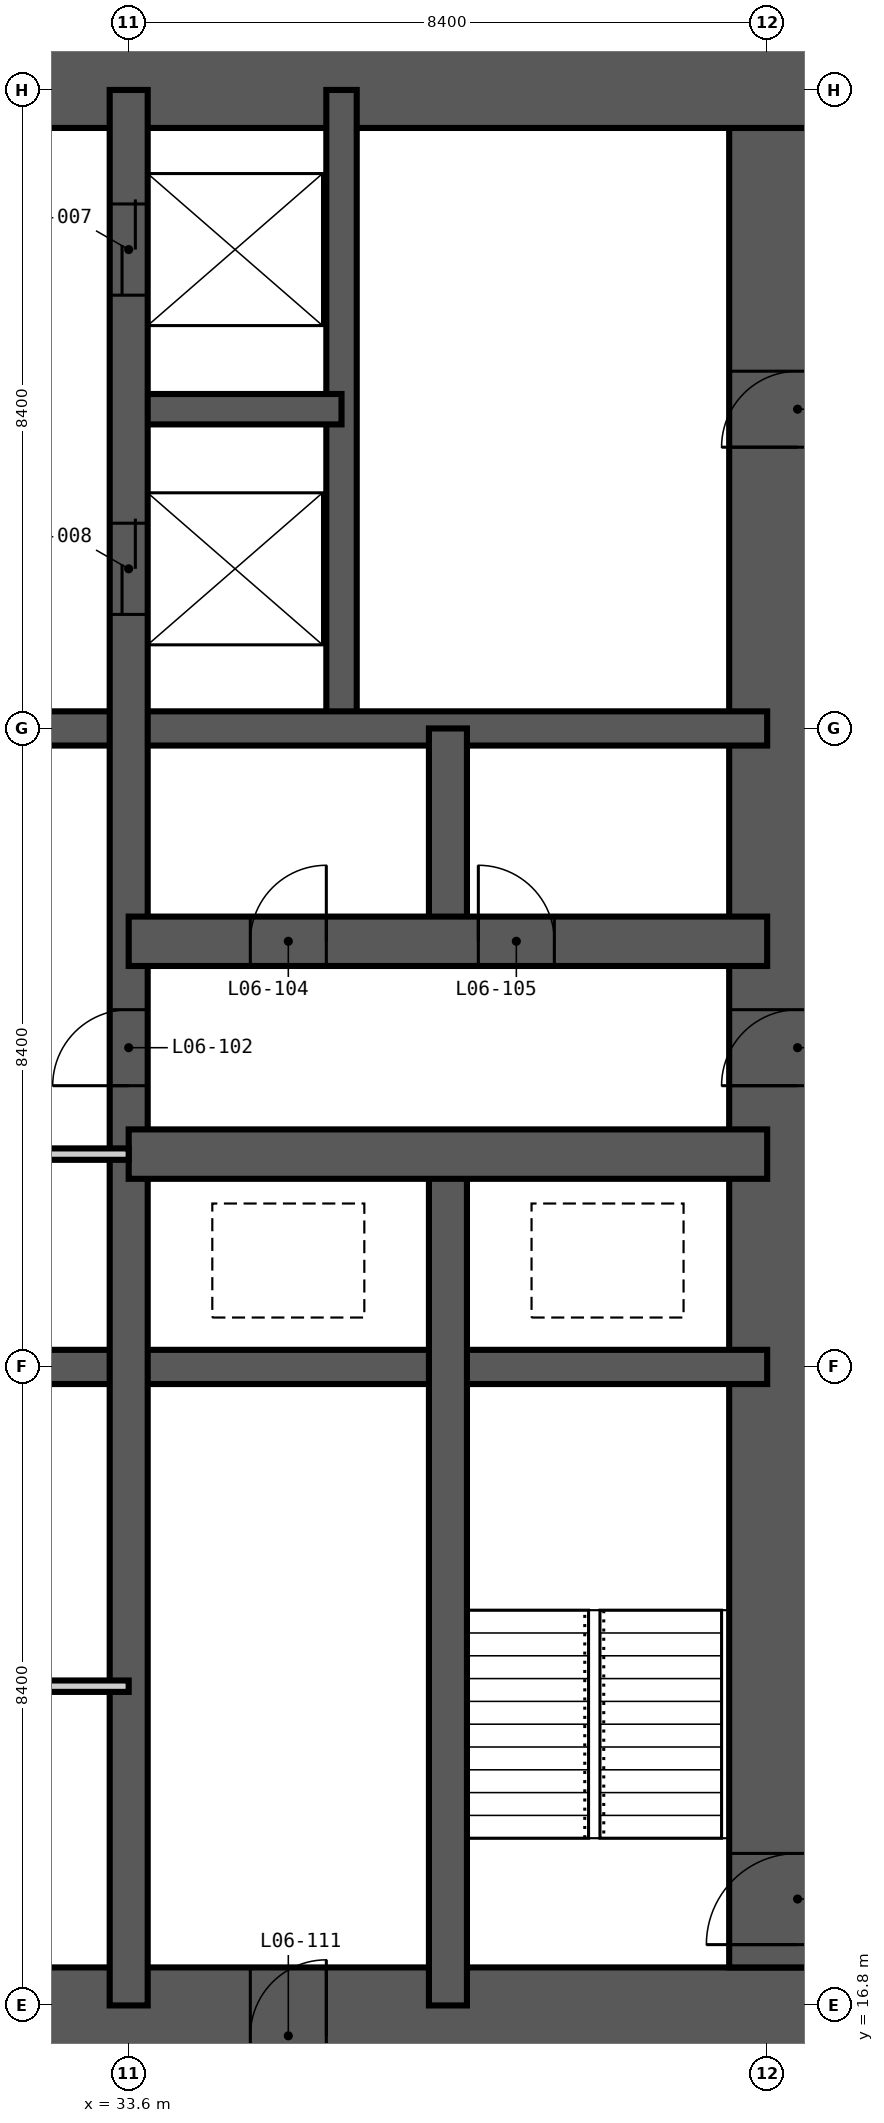
"""IFC4 building model, lengths in metres.
Left out: names, types, materials, properties, quantities, classifications, styles, units other than length and angle.
Written with IfcOpenShell. Run it as: python <this file> out.ifc"""

import sys

from ifc_helpers import new_model, si_unit, direction, frame, frame_2d, origin, place, context, subcontext, project, spatial, rectangle, extrude, element, fill, save


model = new_model("IFC4")
c1 = context("Model", 3, precision=1e-05, world=origin(), true_north=direction((0.0, 1.0)))
c2 = subcontext(c1, "Body", "Model", "MODEL_VIEW")
j1 = project(units=[si_unit("LENGTHUNIT", "METRE"), si_unit("PLANEANGLEUNIT", "RADIAN")], contexts=[c1])
p1 = place(None, origin())
s1 = spatial("IfcSite", under=j1, at=p1, CompositionType="ELEMENT")
p2 = place(p1, origin())
s2 = spatial("IfcBuilding", under=s1, at=p2, CompositionType="ELEMENT")
p3 = place(p2, frame((0.0, 0.0, 30.6)))
s3 = spatial("IfcBuildingStorey", under=s2, at=p3, CompositionType="ELEMENT", Elevation=30.6)
p4 = place(p3, frame((15.5, 16.4, -0.35), z_axis=(0.0, 0.0, 1.0), x_axis=(1.0, 0.0, 0.0)))
e1 = element("IfcWall", 1, at=p4, inside=s3, PredefinedType="SHEAR", context=c2, shape_type="SweptSolid", body=[
    extrude(rectangle(XDim=27.8, YDim=1.8, at=frame_2d((13.9, 0.0))), origin(), (0.0, 0.0, 1.0), 3.6),
])
p5 = place(p4, frame((13.4, 0.0, 0.35)))
e2 = element("IfcOpeningElement", 2, at=p5, cuts=e1, PredefinedType="OPENING", context=c2, shape_type="SweptSolid", body=[
    extrude(rectangle(XDim=1.0, YDim=2.1, at=frame_2d((0.5, 1.05))), frame((0.0, 0.91, 0.0), z_axis=(0.0, -1.0, 0.0), x_axis=(1.0, 0.0, 0.0)), (0.0, 0.0, 1.0), 1.82),
])
p6 = place(p4, frame((19.7, 0.0, 0.35)))
e3 = element("IfcOpeningElement", 3, at=p6, cuts=e1, PredefinedType="OPENING", context=c2, shape_type="SweptSolid", body=[
    extrude(rectangle(XDim=1.0, YDim=2.1, at=frame_2d((0.5, 1.05))), frame((0.0, 0.91, 0.0), z_axis=(0.0, -1.0, 0.0), x_axis=(1.0, 0.0, 0.0)), (0.0, 0.0, 1.0), 1.82),
])
p7 = place(p3, frame((42.4, 17.3, -0.35), z_axis=(0.0, 0.0, 1.0), x_axis=(0.0, 1.0, 0.0)))
e4 = element("IfcWall", 4, at=p7, inside=s3, PredefinedType="SHEAR", context=c2, shape_type="SweptSolid", body=[
    extrude(rectangle(XDim=24.2, YDim=1.8, at=frame_2d((12.1, 0.0))), origin(), (0.0, 0.0, 1.0), 3.6),
])
p8 = place(p7, frame((0.3, 0.0, 0.35)))
e5 = element("IfcOpeningElement", 5, at=p8, cuts=e4, PredefinedType="OPENING", context=c2, shape_type="SweptSolid", body=[
    extrude(rectangle(XDim=1.2, YDim=2.2, at=frame_2d((0.6, 1.1))), frame((0.0, 0.91, 0.0), z_axis=(0.0, -1.0, 0.0), x_axis=(1.0, 0.0, 0.0)), (0.0, 0.0, 1.0), 1.82),
])
p9 = place(p7, frame((11.6, 0.0, 0.35)))
e6 = element("IfcOpeningElement", 6, at=p9, cuts=e4, PredefinedType="OPENING", context=c2, shape_type="SweptSolid", body=[
    extrude(rectangle(XDim=1.0, YDim=2.1, at=frame_2d((0.5, 1.05))), frame((0.0, 0.91, 0.0), z_axis=(0.0, -1.0, 0.0), x_axis=(1.0, 0.0, 0.0)), (0.0, 0.0, 1.0), 1.82),
])
p10 = place(p7, frame((20.0, 0.0, 0.35)))
e7 = element("IfcOpeningElement", 7, at=p10, cuts=e4, PredefinedType="OPENING", context=c2, shape_type="SweptSolid", body=[
    extrude(rectangle(XDim=1.0, YDim=2.1, at=frame_2d((0.5, 1.05))), frame((0.0, 0.91, 0.0), z_axis=(0.0, -1.0, 0.0), x_axis=(1.0, 0.0, 0.0)), (0.0, 0.0, 1.0), 1.82),
])
p11 = place(p3, frame((43.3, 42.4, -0.35), z_axis=(0.0, 0.0, 1.0), x_axis=(-1.0, 0.0, 0.0)))
e8 = element("IfcWall", 8, at=p11, inside=s3, PredefinedType="SHEAR", context=c2, shape_type="SweptSolid", body=[
    extrude(rectangle(XDim=27.8, YDim=1.8, at=frame_2d((13.9, 0.0))), origin(), (0.0, 0.0, 1.0), 3.6),
])
p12 = place(p11, frame((21.8, 0.0, 0.35)))
e9 = element("IfcOpeningElement", 9, at=p12, cuts=e8, PredefinedType="OPENING", context=c2, shape_type="SweptSolid", body=[
    extrude(rectangle(XDim=1.0, YDim=2.1, at=frame_2d((0.5, 1.05))), frame((0.0, 0.91, 0.0), z_axis=(0.0, -1.0, 0.0), x_axis=(1.0, 0.0, 0.0)), (0.0, 0.0, 1.0), 1.82),
])
p13 = place(p11, frame((11.2, 0.0, 0.35)))
e10 = element("IfcOpeningElement", 10, at=p13, cuts=e8, PredefinedType="OPENING", context=c2, shape_type="SweptSolid", body=[
    extrude(rectangle(XDim=1.2, YDim=2.2, at=frame_2d((0.6, 1.1))), frame((0.0, 0.91, 0.0), z_axis=(0.0, -1.0, 0.0), x_axis=(1.0, 0.0, 0.0)), (0.0, 0.0, 1.0), 1.82),
])
p14 = place(p3, frame((36.4, 33.6, -0.35), z_axis=(0.0, 0.0, 1.0), x_axis=(0.0, 1.0, 0.0)))
e11 = element("IfcWall", 11, at=p14, inside=s3, PredefinedType="SHEAR", context=c2, shape_type="SweptSolid", body=[
    extrude(rectangle(XDim=8.4, YDim=0.4, at=frame_2d((4.2, 0.0))), origin(), (0.0, 0.0, 1.0), 3.6),
])
p15 = place(p3, frame((33.6, 37.8, -0.35), z_axis=(0.0, 0.0, 1.0), x_axis=(1.0, 0.0, 0.0)))
e12 = element("IfcWall", 12, at=p15, inside=s3, PredefinedType="SHEAR", context=c2, shape_type="SweptSolid", body=[
    extrude(rectangle(XDim=2.8, YDim=0.4, at=frame_2d((1.4, 0.0))), origin(), (0.0, 0.0, 1.0), 3.6),
])
for number, where, z_axis, x_axis in (
    (13, (16.8, 25.2, -0.35), (0.0, 0.0, 1.0), (1.0, 0.0, 0.0)),
    (14, (16.8, 33.6, -0.35), (0.0, 0.0, 1.0), (1.0, 0.0, 0.0)),
):
    element("IfcWall", number, at=place(p3, frame(where, z_axis=z_axis, x_axis=x_axis)), inside=s3, PredefinedType="SHEAR", context=c2, shape_type="SweptSolid", body=[
        extrude(rectangle(XDim=25.2, YDim=0.45, at=frame_2d((12.6, 0.0))), origin(), (0.0, 0.0, 1.0), 3.6),
    ])
p16 = place(p3, frame((33.6, 16.8, -0.35), z_axis=(0.0, 0.0, 1.0), x_axis=(0.0, 1.0, 0.0)))
e15 = element("IfcWall", 15, at=p16, inside=s3, PredefinedType="SHEAR", context=c2, shape_type="SweptSolid", body=[
    extrude(rectangle(XDim=25.2, YDim=0.5, at=frame_2d((12.6, 0.0))), origin(), (0.0, 0.0, 1.0), 3.6),
])
p17 = place(p16, frame((22.5, 0.0, 0.35)))
e16 = element("IfcOpeningElement", 16, at=p17, cuts=e15, PredefinedType="OPENING", context=c2, shape_type="SweptSolid", body=[
    extrude(rectangle(XDim=1.2, YDim=2.2, at=frame_2d((0.6, 1.1))), frame((0.0, 0.26, 0.0), z_axis=(0.0, -1.0, 0.0), x_axis=(1.0, 0.0, 0.0)), (0.0, 0.0, 1.0), 0.52),
])
p18 = place(p16, frame((18.3, 0.0, 0.35)))
e17 = element("IfcOpeningElement", 17, at=p18, cuts=e15, PredefinedType="OPENING", context=c2, shape_type="SweptSolid", body=[
    extrude(rectangle(XDim=1.2, YDim=2.2, at=frame_2d((0.6, 1.1))), frame((0.0, 0.26, 0.0), z_axis=(0.0, -1.0, 0.0), x_axis=(1.0, 0.0, 0.0)), (0.0, 0.0, 1.0), 0.52),
])
p19 = place(p16, frame((12.1, 0.0, 0.35)))
e18 = element("IfcOpeningElement", 18, at=p19, cuts=e15, PredefinedType="OPENING", context=c2, shape_type="SweptSolid", body=[
    extrude(rectangle(XDim=1.0, YDim=2.1, at=frame_2d((0.5, 1.05))), frame((0.0, 0.26, 0.0), z_axis=(0.0, -1.0, 0.0), x_axis=(1.0, 0.0, 0.0)), (0.0, 0.0, 1.0), 0.52),
])
p20 = place(p3, frame((37.8, 16.8, -0.35), z_axis=(0.0, 0.0, 1.0), x_axis=(0.0, 1.0, 0.0)))
e19 = element("IfcWall", 19, at=p20, inside=s3, PredefinedType="SHEAR", context=c2, shape_type="SweptSolid", body=[
    extrude(rectangle(XDim=11.2, YDim=0.5, at=frame_2d((5.6, 0.0))), origin(), (0.0, 0.0, 1.0), 3.6),
])
p21 = place(p3, frame((37.8, 30.8, -0.35), z_axis=(0.0, 0.0, 1.0), x_axis=(0.0, 1.0, 0.0)))
e20 = element("IfcWall", 20, at=p21, inside=s3, PredefinedType="SHEAR", context=c2, shape_type="SweptSolid", body=[
    extrude(rectangle(XDim=2.8, YDim=0.5, at=frame_2d((1.4, 0.0))), origin(), (0.0, 0.0, 1.0), 3.6),
])
p22 = place(p3, frame((33.6, 28.0, -0.35), z_axis=(0.0, 0.0, 1.0), x_axis=(1.0, 0.0, 0.0)))
e21 = element("IfcWall", 21, at=p22, inside=s3, PredefinedType="SHEAR", context=c2, shape_type="SweptSolid", body=[
    extrude(rectangle(XDim=8.4, YDim=0.65, at=frame_2d((4.2, 0.0))), origin(), (0.0, 0.0, 1.0), 3.6),
])
p23 = place(p3, frame((33.6, 30.8, -0.35), z_axis=(0.0, 0.0, 1.0), x_axis=(1.0, 0.0, 0.0)))
e22 = element("IfcWall", 22, at=p23, inside=s3, PredefinedType="SHEAR", context=c2, shape_type="SweptSolid", body=[
    extrude(rectangle(XDim=8.4, YDim=0.65, at=frame_2d((4.2, 0.0))), origin(), (0.0, 0.0, 1.0), 3.6),
])
p24 = place(p23, frame((1.6, 0.0, 0.35)))
e23 = element("IfcOpeningElement", 23, at=p24, cuts=e22, PredefinedType="OPENING", context=c2, shape_type="SweptSolid", body=[
    extrude(rectangle(XDim=1.0, YDim=2.1, at=frame_2d((0.5, 1.05))), frame((0.0, 0.335, 0.0), z_axis=(0.0, -1.0, 0.0), x_axis=(1.0, 0.0, 0.0)), (0.0, 0.0, 1.0), 0.67),
])
p25 = place(p23, frame((4.6, 0.0, 0.35)))
e24 = element("IfcOpeningElement", 24, at=p25, cuts=e22, PredefinedType="OPENING", context=c2, shape_type="SweptSolid", body=[
    extrude(rectangle(XDim=1.0, YDim=2.1, at=frame_2d((0.5, 1.05))), frame((0.0, 0.335, 0.0), z_axis=(0.0, -1.0, 0.0), x_axis=(1.0, 0.0, 0.0)), (0.0, 0.0, 1.0), 0.67),
])
p26 = place(p3, frame((25.2, 21.0, 0.0), z_axis=(0.0, 0.0, 1.0), x_axis=(1.0, 0.0, 0.0)))
e25 = element("IfcWall", 25, at=p26, inside=s3, PredefinedType="PARTITIONING", context=c2, shape_type="SweptSolid", body=[
    extrude(rectangle(XDim=8.4, YDim=0.15, at=frame_2d((4.2, 0.0))), origin(), (0.0, 0.0, 1.0), 3.25),
])
p27 = place(p26, frame((3.7, 0.0, 0.0)))
e26 = element("IfcOpeningElement", 26, at=p27, cuts=e25, PredefinedType="OPENING", context=c2, shape_type="SweptSolid", body=[
    extrude(rectangle(XDim=1.0, YDim=2.1, at=frame_2d((0.5, 1.05))), frame((0.0, 0.085, 0.0), z_axis=(0.0, -1.0, 0.0), x_axis=(1.0, 0.0, 0.0)), (0.0, 0.0, 1.0), 0.17),
])
p28 = place(p3, frame((25.2, 28.0, 0.0), z_axis=(0.0, 0.0, 1.0), x_axis=(1.0, 0.0, 0.0)))
e27 = element("IfcWall", 27, at=p28, inside=s3, PredefinedType="PARTITIONING", context=c2, shape_type="SweptSolid", body=[
    extrude(rectangle(XDim=8.4, YDim=0.15, at=frame_2d((4.2, 0.0))), origin(), (0.0, 0.0, 1.0), 3.25),
])
p29 = place(p28, frame((3.7, 0.0, 0.0)))
e28 = element("IfcOpeningElement", 28, at=p29, cuts=e27, PredefinedType="OPENING", context=c2, shape_type="SweptSolid", body=[
    extrude(rectangle(XDim=1.0, YDim=2.1, at=frame_2d((0.5, 1.05))), frame((0.0, 0.085, 0.0), z_axis=(0.0, -1.0, 0.0), x_axis=(1.0, 0.0, 0.0)), (0.0, 0.0, 1.0), 0.17),
])
p30 = place(p8, origin())
e29 = element("IfcDoor", 29, at=p30, inside=s3, OperationType="SINGLE_SWING_LEFT", PredefinedType="DOOR", context=c2, shape_type="SweptSolid", body=[
    extrude(rectangle(XDim=1.2, YDim=2.2, at=frame_2d((0.6, 1.1))), frame((0.0, 0.025, 0.0), z_axis=(0.0, -1.0, 0.0), x_axis=(1.0, 0.0, 0.0)), (0.0, 0.0, 1.0), 0.05),
])
fill(e5, e29)
p31 = place(p17, origin())
e30 = element("IfcDoor", 30, at=p31, inside=s3, OperationType="DOUBLE_DOOR_SLIDING", PredefinedType="DOOR", context=c2, shape_type="SweptSolid", body=[
    extrude(rectangle(XDim=1.2, YDim=2.2, at=frame_2d((0.6, 1.1))), frame((0.0, 0.025, 0.0), z_axis=(0.0, -1.0, 0.0), x_axis=(1.0, 0.0, 0.0)), (0.0, 0.0, 1.0), 0.05),
])
fill(e16, e30)
p32 = place(p18, origin())
e31 = element("IfcDoor", 31, at=p32, inside=s3, OperationType="DOUBLE_DOOR_SLIDING", PredefinedType="DOOR", context=c2, shape_type="SweptSolid", body=[
    extrude(rectangle(XDim=1.2, YDim=2.2, at=frame_2d((0.6, 1.1))), frame((0.0, 0.025, 0.0), z_axis=(0.0, -1.0, 0.0), x_axis=(1.0, 0.0, 0.0)), (0.0, 0.0, 1.0), 0.05),
])
fill(e17, e31)
p33 = place(p19, origin())
e32 = element("IfcDoor", 32, at=p33, inside=s3, OperationType="SINGLE_SWING_LEFT", PredefinedType="DOOR", context=c2, shape_type="SweptSolid", body=[
    extrude(rectangle(XDim=1.0, YDim=2.1, at=frame_2d((0.5, 1.05))), frame((0.0, 0.025, 0.0), z_axis=(0.0, -1.0, 0.0), x_axis=(1.0, 0.0, 0.0)), (0.0, 0.0, 1.0), 0.05),
])
fill(e18, e32)
p34 = place(p24, origin())
e33 = element("IfcDoor", 33, at=p34, inside=s3, OperationType="SINGLE_SWING_RIGHT", PredefinedType="DOOR", context=c2, shape_type="SweptSolid", body=[
    extrude(rectangle(XDim=1.0, YDim=2.1, at=frame_2d((0.5, 1.05))), frame((0.0, 0.025, 0.0), z_axis=(0.0, -1.0, 0.0), x_axis=(1.0, 0.0, 0.0)), (0.0, 0.0, 1.0), 0.05),
])
fill(e23, e33)
p35 = place(p25, origin())
e34 = element("IfcDoor", 34, at=p35, inside=s3, OperationType="SINGLE_SWING_LEFT", PredefinedType="DOOR", context=c2, shape_type="SweptSolid", body=[
    extrude(rectangle(XDim=1.0, YDim=2.1, at=frame_2d((0.5, 1.05))), frame((0.0, 0.025, 0.0), z_axis=(0.0, -1.0, 0.0), x_axis=(1.0, 0.0, 0.0)), (0.0, 0.0, 1.0), 0.05),
])
fill(e24, e34)
p36 = place(p9, origin())
e35 = element("IfcDoor", 35, at=p36, inside=s3, OperationType="SINGLE_SWING_LEFT", PredefinedType="DOOR", context=c2, shape_type="SweptSolid", body=[
    extrude(rectangle(XDim=1.0, YDim=2.1, at=frame_2d((0.5, 1.05))), frame((0.0, 0.025, 0.0), z_axis=(0.0, -1.0, 0.0), x_axis=(1.0, 0.0, 0.0)), (0.0, 0.0, 1.0), 0.05),
])
fill(e6, e35)
p37 = place(p10, origin())
e36 = element("IfcDoor", 36, at=p37, inside=s3, OperationType="SINGLE_SWING_LEFT", PredefinedType="DOOR", context=c2, shape_type="SweptSolid", body=[
    extrude(rectangle(XDim=1.0, YDim=2.1, at=frame_2d((0.5, 1.05))), frame((0.0, 0.025, 0.0), z_axis=(0.0, -1.0, 0.0), x_axis=(1.0, 0.0, 0.0)), (0.0, 0.0, 1.0), 0.05),
])
fill(e7, e36)
p38 = place(p6, origin())
e37 = element("IfcDoor", 37, at=p38, inside=s3, OperationType="SINGLE_SWING_RIGHT", PredefinedType="DOOR", context=c2, shape_type="SweptSolid", body=[
    extrude(rectangle(XDim=1.0, YDim=2.1, at=frame_2d((0.5, 1.05))), frame((0.0, 0.025, 0.0), z_axis=(0.0, -1.0, 0.0), x_axis=(1.0, 0.0, 0.0)), (0.0, 0.0, 1.0), 0.05),
])
fill(e3, e37)
save(model, sys.argv[1])
